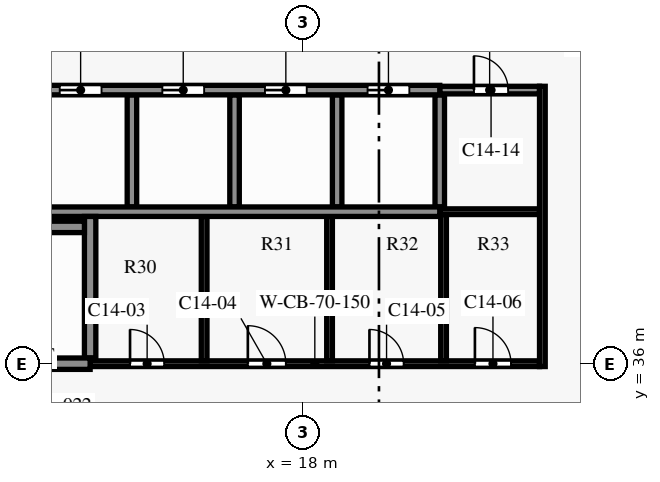
"""IFC4 building model, lengths in metres.
Left out: names, types, materials, properties, quantities, classifications, styles, units other than length and angle.
Written with IfcOpenShell. Run it as: python <this file> out.ifc"""

import sys

from ifc_helpers import new_model, si_unit, direction, frame, frame_2d, origin, place, context, subcontext, project, spatial, rectangle, extrude, element, fill, save


model = new_model("IFC4")
c1 = context("Model", 3, precision=1e-05, world=origin(), true_north=direction((0.0, 1.0)))
c2 = subcontext(c1, "Body", "Model", "MODEL_VIEW")
j1 = project(units=[si_unit("LENGTHUNIT", "METRE"), si_unit("PLANEANGLEUNIT", "RADIAN")], contexts=[c1])
p1 = place(None, origin())
s1 = spatial("IfcSite", under=j1, at=p1, CompositionType="ELEMENT")
p2 = place(p1, origin())
s2 = spatial("IfcBuilding", under=s1, at=p2, CompositionType="ELEMENT")
p3 = place(p2, frame((0.0, 0.0, 92.3)))
s3 = spatial("IfcBuildingStorey", under=s2, at=p3, CompositionType="ELEMENT", Elevation=92.3)
p4 = place(p3, frame((12.4, 36.0, 0.0), z_axis=(0.0, 0.0, 1.0), x_axis=(1.0, 0.0, 0.0)))
e1 = element("IfcWall", 1, at=p4, inside=s3, PredefinedType="SHEAR", context=c2, shape_type="SweptSolid", body=[
    extrude(rectangle(XDim=11.825, YDim=0.15, at=frame_2d((5.913, 0.0))), origin(), (0.0, 0.0, 1.0), 3.5),
])
p5 = place(p4, frame((1.05, 0.0, 0.0)))
e2 = element("IfcOpeningElement", 2, at=p5, cuts=e1, PredefinedType="OPENING", context=c2, shape_type="SweptSolid", body=[
    extrude(rectangle(XDim=0.9, YDim=2.1, at=frame_2d((0.45, 1.05))), frame((0.0, 0.085, 0.0), z_axis=(0.0, -1.0, 0.0), x_axis=(1.0, 0.0, 0.0)), (0.0, 0.0, 1.0), 0.17),
])
p6 = place(p4, frame((4.15, 0.0, 0.0)))
e3 = element("IfcOpeningElement", 3, at=p6, cuts=e1, PredefinedType="OPENING", context=c2, shape_type="SweptSolid", body=[
    extrude(rectangle(XDim=1.0, YDim=2.1, at=frame_2d((0.5, 1.05))), frame((0.0, 0.085, 0.0), z_axis=(0.0, -1.0, 0.0), x_axis=(1.0, 0.0, 0.0)), (0.0, 0.0, 1.0), 0.17),
])
p7 = place(p4, frame((7.35, 0.0, 0.0)))
e4 = element("IfcOpeningElement", 4, at=p7, cuts=e1, PredefinedType="OPENING", context=c2, shape_type="SweptSolid", body=[
    extrude(rectangle(XDim=0.9, YDim=2.1, at=frame_2d((0.45, 1.05))), frame((0.0, 0.085, 0.0), z_axis=(0.0, -1.0, 0.0), x_axis=(1.0, 0.0, 0.0)), (0.0, 0.0, 1.0), 0.17),
])
p8 = place(p4, frame((10.125, 0.0, 0.0)))
e5 = element("IfcOpeningElement", 5, at=p8, cuts=e1, PredefinedType="OPENING", context=c2, shape_type="SweptSolid", body=[
    extrude(rectangle(XDim=0.95, YDim=2.1, at=frame_2d((0.475, 1.05))), frame((0.0, 0.085, 0.0), z_axis=(0.0, -1.0, 0.0), x_axis=(1.0, 0.0, 0.0)), (0.0, 0.0, 1.0), 0.17),
])
p9 = place(p3, frame((4.4, 36.0, 0.0), z_axis=(0.0, 0.0, 1.0), x_axis=(1.0, 0.0, 0.0)))
e6 = element("IfcWall", 6, at=p9, inside=s3, PredefinedType="SHEAR", context=c2, shape_type="SweptSolid", body=[
    extrude(rectangle(XDim=8.0, YDim=0.3, at=frame_2d((4.0, 0.0))), origin(), (0.0, 0.0, 1.0), 3.5),
])
p10 = place(p9, frame((0.3, 0.0, 0.0)))
e7 = element("IfcOpeningElement", 7, at=p10, cuts=e6, PredefinedType="OPENING", context=c2, shape_type="SweptSolid", body=[
    extrude(rectangle(XDim=1.5, YDim=2.2, at=frame_2d((0.75, 1.1))), frame((0.0, 0.16, 0.0), z_axis=(0.0, -1.0, 0.0), x_axis=(1.0, 0.0, 0.0)), (0.0, 0.0, 1.0), 0.32),
])
p11 = place(p3, frame((4.55, 39.6, 0.0), z_axis=(0.0, 0.0, 1.0), x_axis=(1.0, 0.0, 0.0)))
e8 = element("IfcWall", 8, at=p11, inside=s3, PredefinedType="SHEAR", context=c2, shape_type="SweptSolid", body=[
    extrude(rectangle(XDim=7.7, YDim=0.3, at=frame_2d((3.85, 0.0))), origin(), (0.0, 0.0, 1.0), 3.5),
])
p12 = place(p3, frame((21.6, 40.0, 0.0), z_axis=(0.0, 0.0, 1.0), x_axis=(1.0, 0.0, 0.0)))
e9 = element("IfcWall", 9, at=p12, inside=s3, PredefinedType="PARTITIONING", context=c2, shape_type="SweptSolid", body=[
    extrude(rectangle(XDim=2.625, YDim=0.15, at=frame_2d((1.312, 0.0))), origin(), (0.0, 0.0, 1.0), 3.5),
])
p13 = place(p3, frame((8.1, 40.0, 0.0), z_axis=(0.0, 0.0, 1.0), x_axis=(1.0, 0.0, 0.0)))
e10 = element("IfcWall", 10, at=p13, inside=s3, PredefinedType="SHEAR", context=c2, shape_type="SweptSolid", body=[
    extrude(rectangle(XDim=13.5, YDim=0.25, at=frame_2d((6.75, 0.0))), origin(), (0.0, 0.0, 1.0), 3.5),
])
p14 = place(p3, frame((21.6, 43.2, 0.0), z_axis=(0.0, 0.0, 1.0), x_axis=(1.0, 0.0, 0.0)))
e11 = element("IfcWall", 11, at=p14, inside=s3, PredefinedType="PARTITIONING", context=c2, shape_type="SweptSolid", body=[
    extrude(rectangle(XDim=2.625, YDim=0.2, at=frame_2d((1.312, 0.0))), origin(), (0.0, 0.0, 1.0), 3.5),
])
p15 = place(p14, frame((0.9, 0.0, 0.0)))
e12 = element("IfcOpeningElement", 12, at=p15, cuts=e11, PredefinedType="OPENING", context=c2, shape_type="SweptSolid", body=[
    extrude(rectangle(XDim=0.9, YDim=2.1, at=frame_2d((0.45, 1.05))), frame((0.0, 0.11, 0.0), z_axis=(0.0, -1.0, 0.0), x_axis=(1.0, 0.0, 0.0)), (0.0, 0.0, 1.0), 0.22),
])
p16 = place(p3, frame((8.1, 43.2, 0.0), z_axis=(0.0, 0.0, 1.0), x_axis=(1.0, 0.0, 0.0)))
e13 = element("IfcWall", 13, at=p16, inside=s3, PredefinedType="SHEAR", context=c2, shape_type="SweptSolid", body=[
    extrude(rectangle(XDim=13.5, YDim=0.25, at=frame_2d((6.75, 0.0))), origin(), (0.0, 0.0, 1.0), 3.5),
])
p17 = place(p16, frame((0.8, 0.0, 0.0)))
e14 = element("IfcOpeningElement", 14, at=p17, cuts=e13, PredefinedType="OPENING", context=c2, shape_type="SweptSolid", body=[
    extrude(rectangle(XDim=1.1, YDim=2.1, at=frame_2d((0.55, 1.05))), frame((0.0, 0.135, 0.0), z_axis=(0.0, -1.0, 0.0), x_axis=(1.0, 0.0, 0.0)), (0.0, 0.0, 1.0), 0.27),
])
p18 = place(p16, frame((3.5, 0.0, 0.0)))
e15 = element("IfcOpeningElement", 15, at=p18, cuts=e13, PredefinedType="OPENING", context=c2, shape_type="SweptSolid", body=[
    extrude(rectangle(XDim=1.1, YDim=2.1, at=frame_2d((0.55, 1.05))), frame((0.0, 0.135, 0.0), z_axis=(0.0, -1.0, 0.0), x_axis=(1.0, 0.0, 0.0)), (0.0, 0.0, 1.0), 0.27),
])
p19 = place(p16, frame((6.2, 0.0, 0.0)))
e16 = element("IfcOpeningElement", 16, at=p19, cuts=e13, PredefinedType="OPENING", context=c2, shape_type="SweptSolid", body=[
    extrude(rectangle(XDim=1.1, YDim=2.1, at=frame_2d((0.55, 1.05))), frame((0.0, 0.135, 0.0), z_axis=(0.0, -1.0, 0.0), x_axis=(1.0, 0.0, 0.0)), (0.0, 0.0, 1.0), 0.27),
])
p20 = place(p16, frame((8.9, 0.0, 0.0)))
e17 = element("IfcOpeningElement", 17, at=p20, cuts=e13, PredefinedType="OPENING", context=c2, shape_type="SweptSolid", body=[
    extrude(rectangle(XDim=1.1, YDim=2.1, at=frame_2d((0.55, 1.05))), frame((0.0, 0.135, 0.0), z_axis=(0.0, -1.0, 0.0), x_axis=(1.0, 0.0, 0.0)), (0.0, 0.0, 1.0), 0.27),
])
p21 = place(p16, frame((11.6, 0.0, 0.0)))
e18 = element("IfcOpeningElement", 18, at=p21, cuts=e13, PredefinedType="OPENING", context=c2, shape_type="SweptSolid", body=[
    extrude(rectangle(XDim=1.1, YDim=2.1, at=frame_2d((0.55, 1.05))), frame((0.0, 0.135, 0.0), z_axis=(0.0, -1.0, 0.0), x_axis=(1.0, 0.0, 0.0)), (0.0, 0.0, 1.0), 0.27),
])
p22 = place(p3, frame((12.4, 36.15, 0.0), z_axis=(0.0, 0.0, 1.0), x_axis=(0.0, 1.0, 0.0)))
e19 = element("IfcWall", 19, at=p22, inside=s3, PredefinedType="SHEAR", context=c2, shape_type="SweptSolid", body=[
    extrude(rectangle(XDim=3.725, YDim=0.3, at=frame_2d((1.863, 0.0))), origin(), (0.0, 0.0, 1.0), 3.5),
])
p23 = place(p3, frame((13.5, 40.125, 0.0), z_axis=(0.0, 0.0, 1.0), x_axis=(0.0, 1.0, 0.0)))
e20 = element("IfcWall", 20, at=p23, inside=s3, PredefinedType="SHEAR", context=c2, shape_type="SweptSolid", body=[
    extrude(rectangle(XDim=2.95, YDim=0.25, at=frame_2d((1.475, 0.0))), origin(), (0.0, 0.0, 1.0), 3.5),
])
p24 = place(p3, frame((15.4, 36.075, 0.0), z_axis=(0.0, 0.0, 1.0), x_axis=(0.0, 1.0, 0.0)))
e21 = element("IfcWall", 21, at=p24, inside=s3, PredefinedType="PARTITIONING", context=c2, shape_type="SweptSolid", body=[
    extrude(rectangle(XDim=3.8, YDim=0.15, at=frame_2d((1.9, 0.0))), origin(), (0.0, 0.0, 1.0), 3.5),
])
p25 = place(p3, frame((16.2, 40.125, 0.0), z_axis=(0.0, 0.0, 1.0), x_axis=(0.0, 1.0, 0.0)))
e22 = element("IfcWall", 22, at=p25, inside=s3, PredefinedType="SHEAR", context=c2, shape_type="SweptSolid", body=[
    extrude(rectangle(XDim=2.95, YDim=0.25, at=frame_2d((1.475, 0.0))), origin(), (0.0, 0.0, 1.0), 3.5),
])
p26 = place(p3, frame((18.7, 36.075, 0.0), z_axis=(0.0, 0.0, 1.0), x_axis=(0.0, 1.0, 0.0)))
e23 = element("IfcWall", 23, at=p26, inside=s3, PredefinedType="PARTITIONING", context=c2, shape_type="SweptSolid", body=[
    extrude(rectangle(XDim=3.8, YDim=0.15, at=frame_2d((1.9, 0.0))), origin(), (0.0, 0.0, 1.0), 3.5),
])
for number, where, z_axis, x_axis in (
    (24, (18.9, 40.125, 0.0), (0.0, 0.0, 1.0), (0.0, 1.0, 0.0)),
    (25, (21.6, 40.125, 0.0), (0.0, 0.0, 1.0), (0.0, 1.0, 0.0)),
):
    element("IfcWall", number, at=place(p3, frame(where, z_axis=z_axis, x_axis=x_axis)), inside=s3, PredefinedType="SHEAR", context=c2, shape_type="SweptSolid", body=[
        extrude(rectangle(XDim=2.95, YDim=0.25, at=frame_2d((1.475, 0.0))), origin(), (0.0, 0.0, 1.0), 3.5),
    ])
p27 = place(p3, frame((21.7, 36.075, 0.0), z_axis=(0.0, 0.0, 1.0), x_axis=(0.0, 1.0, 0.0)))
e26 = element("IfcWall", 26, at=p27, inside=s3, PredefinedType="PARTITIONING", context=c2, shape_type="SweptSolid", body=[
    extrude(rectangle(XDim=3.85, YDim=0.15, at=frame_2d((1.925, 0.0))), origin(), (0.0, 0.0, 1.0), 3.5),
])
p28 = place(p3, frame((24.3, 35.925, 0.0), z_axis=(0.0, 0.0, 1.0), x_axis=(0.0, 1.0, 0.0)))
e27 = element("IfcWall", 27, at=p28, inside=s3, PredefinedType="PARTITIONING", context=c2, shape_type="SweptSolid", body=[
    extrude(rectangle(XDim=7.375, YDim=0.15, at=frame_2d((3.688, 0.0))), origin(), (0.0, 0.0, 1.0), 3.5),
])
p29 = place(p5, origin())
e28 = element("IfcDoor", 28, at=p29, inside=s3, OperationType="SINGLE_SWING_RIGHT", PredefinedType="DOOR", context=c2, shape_type="SweptSolid", body=[
    extrude(rectangle(XDim=0.9, YDim=2.1, at=frame_2d((0.45, 1.05))), frame((0.0, 0.025, 0.0), z_axis=(0.0, -1.0, 0.0), x_axis=(1.0, 0.0, 0.0)), (0.0, 0.0, 1.0), 0.05),
])
fill(e2, e28)
p30 = place(p6, origin())
e29 = element("IfcDoor", 29, at=p30, inside=s3, OperationType="SINGLE_SWING_LEFT", PredefinedType="DOOR", context=c2, shape_type="SweptSolid", body=[
    extrude(rectangle(XDim=1.0, YDim=2.1, at=frame_2d((0.5, 1.05))), frame((0.0, 0.025, 0.0), z_axis=(0.0, -1.0, 0.0), x_axis=(1.0, 0.0, 0.0)), (0.0, 0.0, 1.0), 0.05),
])
fill(e3, e29)
p31 = place(p7, origin())
e30 = element("IfcDoor", 30, at=p31, inside=s3, OperationType="SINGLE_SWING_RIGHT", PredefinedType="DOOR", context=c2, shape_type="SweptSolid", body=[
    extrude(rectangle(XDim=0.9, YDim=2.1, at=frame_2d((0.45, 1.05))), frame((0.0, 0.025, 0.0), z_axis=(0.0, -1.0, 0.0), x_axis=(1.0, 0.0, 0.0)), (0.0, 0.0, 1.0), 0.05),
])
fill(e4, e30)
p32 = place(p8, origin())
e31 = element("IfcDoor", 31, at=p32, inside=s3, OperationType="SINGLE_SWING_LEFT", PredefinedType="DOOR", context=c2, shape_type="SweptSolid", body=[
    extrude(rectangle(XDim=0.95, YDim=2.1, at=frame_2d((0.475, 1.05))), frame((0.0, 0.025, 0.0), z_axis=(0.0, -1.0, 0.0), x_axis=(1.0, 0.0, 0.0)), (0.0, 0.0, 1.0), 0.05),
])
fill(e5, e31)
p33 = place(p15, origin())
e32 = element("IfcDoor", 32, at=p33, inside=s3, OperationType="SINGLE_SWING_RIGHT", PredefinedType="DOOR", context=c2, shape_type="SweptSolid", body=[
    extrude(rectangle(XDim=0.9, YDim=2.1, at=frame_2d((0.45, 1.05))), frame((0.0, 0.025, 0.0), z_axis=(0.0, -1.0, 0.0), x_axis=(1.0, 0.0, 0.0)), (0.0, 0.0, 1.0), 0.05),
])
fill(e12, e32)
p34 = place(p18, origin())
e33 = element("IfcDoor", 33, at=p34, inside=s3, OperationType="DOUBLE_DOOR_SLIDING", PredefinedType="DOOR", context=c2, shape_type="SweptSolid", body=[
    extrude(rectangle(XDim=1.1, YDim=2.1, at=frame_2d((0.55, 1.05))), frame((0.0, 0.025, 0.0), z_axis=(0.0, -1.0, 0.0), x_axis=(1.0, 0.0, 0.0)), (0.0, 0.0, 1.0), 0.05),
])
fill(e15, e33)
p35 = place(p19, origin())
e34 = element("IfcDoor", 34, at=p35, inside=s3, OperationType="DOUBLE_DOOR_SLIDING", PredefinedType="DOOR", context=c2, shape_type="SweptSolid", body=[
    extrude(rectangle(XDim=1.1, YDim=2.1, at=frame_2d((0.55, 1.05))), frame((0.0, 0.025, 0.0), z_axis=(0.0, -1.0, 0.0), x_axis=(1.0, 0.0, 0.0)), (0.0, 0.0, 1.0), 0.05),
])
fill(e16, e34)
p36 = place(p20, origin())
e35 = element("IfcDoor", 35, at=p36, inside=s3, OperationType="DOUBLE_DOOR_SLIDING", PredefinedType="DOOR", context=c2, shape_type="SweptSolid", body=[
    extrude(rectangle(XDim=1.1, YDim=2.1, at=frame_2d((0.55, 1.05))), frame((0.0, 0.025, 0.0), z_axis=(0.0, -1.0, 0.0), x_axis=(1.0, 0.0, 0.0)), (0.0, 0.0, 1.0), 0.05),
])
fill(e17, e35)
p37 = place(p21, origin())
e36 = element("IfcDoor", 36, at=p37, inside=s3, OperationType="DOUBLE_DOOR_SLIDING", PredefinedType="DOOR", context=c2, shape_type="SweptSolid", body=[
    extrude(rectangle(XDim=1.1, YDim=2.1, at=frame_2d((0.55, 1.05))), frame((0.0, 0.025, 0.0), z_axis=(0.0, -1.0, 0.0), x_axis=(1.0, 0.0, 0.0)), (0.0, 0.0, 1.0), 0.05),
])
fill(e18, e36)
save(model, sys.argv[1])
